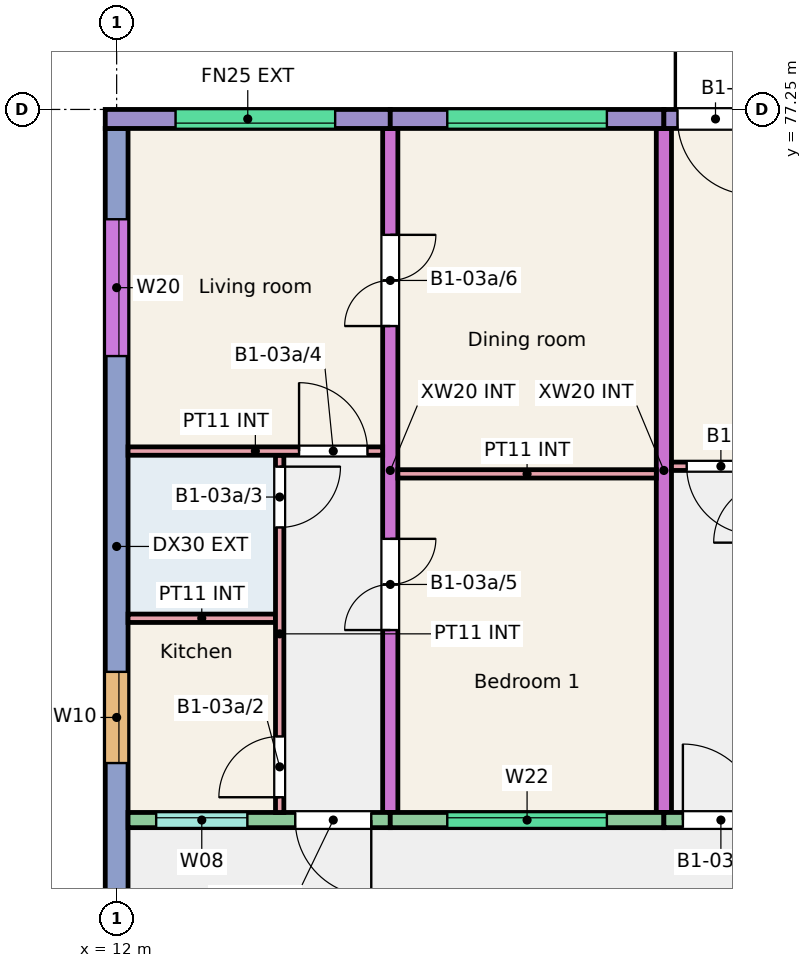
"""IFC4 building model, lengths in metres.
Left out: names, types, materials, properties, quantities, classifications, styles, units other than length and angle.
Written with IfcOpenShell. Run it as: python <this file> out.ifc"""

import sys

from ifc_helpers import new_model, si_unit, direction, frame, frame_2d, origin, place, context, subcontext, project, spatial, rectangle, extrude, element, fill, save


model = new_model("IFC4")
c1 = context("Model", 3, precision=1e-05, world=origin(), true_north=direction((0.0, 1.0)))
c2 = subcontext(c1, "Body", "Model", "MODEL_VIEW")
j1 = project(units=[si_unit("LENGTHUNIT", "METRE"), si_unit("PLANEANGLEUNIT", "RADIAN")], contexts=[c1])
p1 = place(None, origin())
s1 = spatial("IfcSite", under=j1, at=p1, CompositionType="ELEMENT")
p2 = place(p1, origin())
s2 = spatial("IfcBuilding", under=s1, at=p2, CompositionType="ELEMENT")
p3 = place(p2, frame((0.0, 0.0, 9.0)))
s3 = spatial("IfcBuildingStorey", under=s2, at=p3, CompositionType="ELEMENT", Elevation=9.0)
p4 = place(p3, frame((12.0, 66.0, 0.0), z_axis=(0.0, 0.0, 1.0), x_axis=(0.0, 1.0, 0.0)))
e1 = element("IfcWall", 1, at=p4, inside=s3, PredefinedType="SHEAR", context=c2, shape_type="SweptSolid", body=[
    extrude(rectangle(XDim=11.0, YDim=0.3, at=frame_2d((5.5, 0.0))), origin(), (0.0, 0.0, 1.0), 3.0),
])
p5 = place(p4, frame((2.65, 0.0, 0.9)))
e2 = element("IfcOpeningElement", 2, at=p5, cuts=e1, PredefinedType="OPENING", context=c2, shape_type="SweptSolid", body=[
    extrude(rectangle(XDim=1.2, YDim=1.5, at=frame_2d((0.6, 0.75))), frame((0.0, 0.16, 0.0), z_axis=(0.0, -1.0, 0.0), x_axis=(1.0, 0.0, 0.0)), (0.0, 0.0, 1.0), 0.32),
])
p6 = place(p4, frame((8.005, 0.0, 0.9)))
e3 = element("IfcOpeningElement", 3, at=p6, cuts=e1, PredefinedType="OPENING", context=c2, shape_type="SweptSolid", body=[
    extrude(rectangle(XDim=1.8, YDim=1.5, at=frame_2d((0.9, 0.75))), frame((0.0, 0.16, 0.0), z_axis=(0.0, -1.0, 0.0), x_axis=(1.0, 0.0, 0.0)), (0.0, 0.0, 1.0), 0.32),
])
p7 = place(p3, frame((15.6, 68.0, 0.0), z_axis=(0.0, 0.0, 1.0), x_axis=(0.0, 1.0, 0.0)))
e4 = element("IfcWall", 4, at=p7, inside=s3, PredefinedType="SHEAR", context=c2, shape_type="SweptSolid", body=[
    extrude(rectangle(XDim=9.0, YDim=0.2, at=frame_2d((4.5, 0.0))), origin(), (0.0, 0.0, 1.0), 3.0),
])
p8 = place(p7, frame((2.4, 0.0, 0.0)))
e5 = element("IfcOpeningElement", 5, at=p8, cuts=e4, PredefinedType="OPENING", context=c2, shape_type="SweptSolid", body=[
    extrude(rectangle(XDim=1.2, YDim=2.1, at=frame_2d((0.6, 1.05))), frame((0.0, 0.11, 0.0), z_axis=(0.0, -1.0, 0.0), x_axis=(1.0, 0.0, 0.0)), (0.0, 0.0, 1.0), 0.22),
])
p9 = place(p7, frame((6.4, 0.0, 0.0)))
e6 = element("IfcOpeningElement", 6, at=p9, cuts=e4, PredefinedType="OPENING", context=c2, shape_type="SweptSolid", body=[
    extrude(rectangle(XDim=1.2, YDim=2.1, at=frame_2d((0.6, 1.05))), frame((0.0, 0.11, 0.0), z_axis=(0.0, -1.0, 0.0), x_axis=(1.0, 0.0, 0.0)), (0.0, 0.0, 1.0), 0.22),
])
p10 = place(p3, frame((19.2, 68.0, 0.0), z_axis=(0.0, 0.0, 1.0), x_axis=(0.0, 1.0, 0.0)))
e7 = element("IfcWall", 7, at=p10, inside=s3, PredefinedType="SHEAR", context=c2, shape_type="SweptSolid", body=[
    extrude(rectangle(XDim=9.0, YDim=0.2, at=frame_2d((4.5, 0.0))), origin(), (0.0, 0.0, 1.0), 3.0),
])
p11 = place(p3, frame((11.85, 77.125, 0.0), z_axis=(0.0, 0.0, 1.0), x_axis=(1.0, 0.0, 0.0)))
e8 = element("IfcWall", 8, at=p11, inside=s3, PredefinedType="SOLIDWALL", context=c2, shape_type="SweptSolid", body=[
    extrude(rectangle(XDim=3.75, YDim=0.25, at=frame_2d((1.875, 0.0))), origin(), (0.0, 0.0, 1.0), 3.0),
])
p12 = place(p11, frame((0.925, 0.0, 1.2)))
e9 = element("IfcOpeningElement", 9, at=p12, cuts=e8, PredefinedType="OPENING", context=c2, shape_type="SweptSolid", body=[
    extrude(rectangle(XDim=2.1, YDim=1.2, at=frame_2d((1.05, 0.6))), frame((0.0, 0.135, 0.0), z_axis=(0.0, -1.0, 0.0), x_axis=(1.0, 0.0, 0.0)), (0.0, 0.0, 1.0), 0.27),
])
p13 = place(p3, frame((12.15, 67.9, 0.0), z_axis=(0.0, 0.0, 1.0), x_axis=(1.0, 0.0, 0.0)))
e10 = element("IfcWall", 10, at=p13, inside=s3, PredefinedType="SOLIDWALL", context=c2, shape_type="SweptSolid", body=[
    extrude(rectangle(XDim=3.45, YDim=0.2, at=frame_2d((1.725, 0.0))), origin(), (0.0, 0.0, 1.0), 3.0),
])
p14 = place(p13, frame((0.37, 0.0, 1.1)))
e11 = element("IfcOpeningElement", 11, at=p14, cuts=e10, PredefinedType="OPENING", context=c2, shape_type="SweptSolid", body=[
    extrude(rectangle(XDim=1.2, YDim=1.3, at=frame_2d((0.6, 0.65))), frame((0.0, 0.11, 0.0), z_axis=(0.0, -1.0, 0.0), x_axis=(1.0, 0.0, 0.0)), (0.0, 0.0, 1.0), 0.22),
])
p15 = place(p13, frame((2.2, 0.0, 0.0)))
e12 = element("IfcOpeningElement", 12, at=p15, cuts=e10, PredefinedType="OPENING", context=c2, shape_type="SweptSolid", body=[
    extrude(rectangle(XDim=1.0, YDim=2.1, at=frame_2d((0.5, 1.05))), frame((0.0, 0.11, 0.0), z_axis=(0.0, -1.0, 0.0), x_axis=(1.0, 0.0, 0.0)), (0.0, 0.0, 1.0), 0.22),
])
p16 = place(p3, frame((15.6, 77.125, 0.0), z_axis=(0.0, 0.0, 1.0), x_axis=(1.0, 0.0, 0.0)))
e13 = element("IfcWall", 13, at=p16, inside=s3, PredefinedType="SOLIDWALL", context=c2, shape_type="SweptSolid", body=[
    extrude(rectangle(XDim=3.6, YDim=0.25, at=frame_2d((1.8, 0.0))), origin(), (0.0, 0.0, 1.0), 3.0),
])
p17 = place(p16, frame((0.75, 0.0, 1.2)))
e14 = element("IfcOpeningElement", 14, at=p17, cuts=e13, PredefinedType="OPENING", context=c2, shape_type="SweptSolid", body=[
    extrude(rectangle(XDim=2.1, YDim=1.2, at=frame_2d((1.05, 0.6))), frame((0.0, 0.135, 0.0), z_axis=(0.0, -1.0, 0.0), x_axis=(1.0, 0.0, 0.0)), (0.0, 0.0, 1.0), 0.27),
])
p18 = place(p3, frame((15.6, 67.9, 0.0), z_axis=(0.0, 0.0, 1.0), x_axis=(1.0, 0.0, 0.0)))
e15 = element("IfcWall", 15, at=p18, inside=s3, PredefinedType="SOLIDWALL", context=c2, shape_type="SweptSolid", body=[
    extrude(rectangle(XDim=3.6, YDim=0.2, at=frame_2d((1.8, 0.0))), origin(), (0.0, 0.0, 1.0), 3.0),
])
p19 = place(p18, frame((0.75, 0.0, 1.2)))
e16 = element("IfcOpeningElement", 16, at=p19, cuts=e15, PredefinedType="OPENING", context=c2, shape_type="SweptSolid", body=[
    extrude(rectangle(XDim=2.1, YDim=1.2, at=frame_2d((1.05, 0.6))), frame((0.0, 0.11, 0.0), z_axis=(0.0, -1.0, 0.0), x_axis=(1.0, 0.0, 0.0)), (0.0, 0.0, 1.0), 0.22),
])
p20 = place(p3, frame((19.2, 77.125, 0.0), z_axis=(0.0, 0.0, 1.0), x_axis=(1.0, 0.0, 0.0)))
e17 = element("IfcWall", 17, at=p20, inside=s3, PredefinedType="SOLIDWALL", context=c2, shape_type="SweptSolid", body=[
    extrude(rectangle(XDim=3.6, YDim=0.25, at=frame_2d((1.8, 0.0))), origin(), (0.0, 0.0, 1.0), 3.0),
])
p21 = place(p20, frame((1.627, 0.0, 1.2)))
e18 = element("IfcOpeningElement", 18, at=p21, cuts=e17, PredefinedType="OPENING", context=c2, shape_type="SweptSolid", body=[
    extrude(rectangle(XDim=1.5, YDim=1.2, at=frame_2d((0.75, 0.6))), frame((0.0, 0.135, 0.0), z_axis=(0.0, -1.0, 0.0), x_axis=(1.0, 0.0, 0.0)), (0.0, 0.0, 1.0), 0.27),
])
p22 = place(p20, frame((0.179, 0.0, 0.0)))
e19 = element("IfcOpeningElement", 19, at=p22, cuts=e17, PredefinedType="OPENING", context=c2, shape_type="SweptSolid", body=[
    extrude(rectangle(XDim=1.0, YDim=2.1, at=frame_2d((0.5, 1.05))), frame((0.0, 0.135, 0.0), z_axis=(0.0, -1.0, 0.0), x_axis=(1.0, 0.0, 0.0)), (0.0, 0.0, 1.0), 0.27),
])
p23 = place(p3, frame((19.2, 67.9, 0.0), z_axis=(0.0, 0.0, 1.0), x_axis=(1.0, 0.0, 0.0)))
e20 = element("IfcWall", 20, at=p23, inside=s3, PredefinedType="SOLIDWALL", context=c2, shape_type="SweptSolid", body=[
    extrude(rectangle(XDim=3.6, YDim=0.2, at=frame_2d((1.8, 0.0))), origin(), (0.0, 0.0, 1.0), 3.0),
])
p24 = place(p23, frame((1.893, 0.0, 1.1)))
e21 = element("IfcOpeningElement", 21, at=p24, cuts=e20, PredefinedType="OPENING", context=c2, shape_type="SweptSolid", body=[
    extrude(rectangle(XDim=1.2, YDim=1.3, at=frame_2d((0.6, 0.65))), frame((0.0, 0.11, 0.0), z_axis=(0.0, -1.0, 0.0), x_axis=(1.0, 0.0, 0.0)), (0.0, 0.0, 1.0), 0.22),
])
p25 = place(p23, frame((0.25, 0.0, 0.0)))
e22 = element("IfcOpeningElement", 22, at=p25, cuts=e20, PredefinedType="OPENING", context=c2, shape_type="SweptSolid", body=[
    extrude(rectangle(XDim=1.0, YDim=2.1, at=frame_2d((0.5, 1.05))), frame((0.0, 0.11, 0.0), z_axis=(0.0, -1.0, 0.0), x_axis=(1.0, 0.0, 0.0)), (0.0, 0.0, 1.0), 0.22),
])
p26 = place(p3, frame((12.15, 70.555, 0.0), z_axis=(0.0, 0.0, 1.0), x_axis=(1.0, 0.0, 0.0)))
e23 = element("IfcWall", 23, at=p26, inside=s3, PredefinedType="PARTITIONING", context=c2, shape_type="SweptSolid", body=[
    extrude(rectangle(XDim=1.94, YDim=0.11, at=frame_2d((0.97, 0.0))), origin(), (0.0, 0.0, 1.0), 2.8),
])
p27 = place(p3, frame((14.145, 68.0, 0.0), z_axis=(0.0, 0.0, 1.0), x_axis=(0.0, 1.0, 0.0)))
e24 = element("IfcWall", 24, at=p27, inside=s3, PredefinedType="PARTITIONING", context=c2, shape_type="SweptSolid", body=[
    extrude(rectangle(XDim=4.7, YDim=0.11, at=frame_2d((2.35, 0.0))), origin(), (0.0, 0.0, 1.0), 2.8),
])
p28 = place(p27, frame((0.2, 0.0, 0.0)))
e25 = element("IfcOpeningElement", 25, at=p28, cuts=e24, PredefinedType="OPENING", context=c2, shape_type="SweptSolid", body=[
    extrude(rectangle(XDim=0.8, YDim=2.1, at=frame_2d((0.4, 1.05))), frame((0.0, 0.065, 0.0), z_axis=(0.0, -1.0, 0.0), x_axis=(1.0, 0.0, 0.0)), (0.0, 0.0, 1.0), 0.13),
])
p29 = place(p27, frame((3.75, 0.0, 0.0)))
e26 = element("IfcOpeningElement", 26, at=p29, cuts=e24, PredefinedType="OPENING", context=c2, shape_type="SweptSolid", body=[
    extrude(rectangle(XDim=0.8, YDim=2.1, at=frame_2d((0.4, 1.05))), frame((0.0, 0.065, 0.0), z_axis=(0.0, -1.0, 0.0), x_axis=(1.0, 0.0, 0.0)), (0.0, 0.0, 1.0), 0.13),
])
p30 = place(p3, frame((12.15, 72.755, 0.0), z_axis=(0.0, 0.0, 1.0), x_axis=(1.0, 0.0, 0.0)))
e27 = element("IfcWall", 27, at=p30, inside=s3, PredefinedType="PARTITIONING", context=c2, shape_type="SweptSolid", body=[
    extrude(rectangle(XDim=3.35, YDim=0.11, at=frame_2d((1.675, 0.0))), origin(), (0.0, 0.0, 1.0), 2.8),
])
p31 = place(p30, frame((2.25, 0.0, 0.0)))
e28 = element("IfcOpeningElement", 28, at=p31, cuts=e27, PredefinedType="OPENING", context=c2, shape_type="SweptSolid", body=[
    extrude(rectangle(XDim=0.9, YDim=2.1, at=frame_2d((0.45, 1.05))), frame((0.0, 0.065, 0.0), z_axis=(0.0, -1.0, 0.0), x_axis=(1.0, 0.0, 0.0)), (0.0, 0.0, 1.0), 0.13),
])
p32 = place(p3, frame((15.7, 72.455, 0.0), z_axis=(0.0, 0.0, 1.0), x_axis=(1.0, 0.0, 0.0)))
e29 = element("IfcWall", 29, at=p32, inside=s3, PredefinedType="PARTITIONING", context=c2, shape_type="SweptSolid", body=[
    extrude(rectangle(XDim=3.4, YDim=0.11, at=frame_2d((1.7, 0.0))), origin(), (0.0, 0.0, 1.0), 2.8),
])
p33 = place(p3, frame((19.3, 72.555, 0.0), z_axis=(0.0, 0.0, 1.0), x_axis=(1.0, 0.0, 0.0)))
e30 = element("IfcWall", 30, at=p33, inside=s3, PredefinedType="PARTITIONING", context=c2, shape_type="SweptSolid", body=[
    extrude(rectangle(XDim=3.375, YDim=0.11, at=frame_2d((1.688, 0.0))), origin(), (0.0, 0.0, 1.0), 2.8),
])
p34 = place(p33, frame((0.2, 0.0, 0.0)))
e31 = element("IfcOpeningElement", 31, at=p34, cuts=e30, PredefinedType="OPENING", context=c2, shape_type="SweptSolid", body=[
    extrude(rectangle(XDim=0.9, YDim=2.1, at=frame_2d((0.45, 1.05))), frame((0.0, 0.065, 0.0), z_axis=(0.0, -1.0, 0.0), x_axis=(1.0, 0.0, 0.0)), (0.0, 0.0, 1.0), 0.13),
])
p35 = place(p19, origin())
e32 = element("IfcWindow", 32, at=p35, inside=s3, PartitioningType="SINGLE_PANEL", PredefinedType="WINDOW", context=c2, shape_type="SweptSolid", body=[
    extrude(rectangle(XDim=2.1, YDim=1.2, at=frame_2d((1.05, 0.6))), frame((0.0, 0.06, 0.0), z_axis=(0.0, -1.0, 0.0), x_axis=(1.0, 0.0, 0.0)), (0.0, 0.0, 1.0), 0.06),
])
fill(e16, e32)
p36 = place(p17, origin())
e33 = element("IfcWindow", 33, at=p36, inside=s3, PartitioningType="SINGLE_PANEL", PredefinedType="WINDOW", context=c2, shape_type="SweptSolid", body=[
    extrude(rectangle(XDim=2.1, YDim=1.2, at=frame_2d((1.05, 0.6))), frame((0.0, -0.025, 0.0), z_axis=(0.0, -1.0, 0.0), x_axis=(1.0, 0.0, 0.0)), (0.0, 0.0, 1.0), 0.06),
])
fill(e14, e33)
p37 = place(p14, origin())
e34 = element("IfcWindow", 34, at=p37, inside=s3, PartitioningType="SINGLE_PANEL", PredefinedType="WINDOW", context=c2, shape_type="SweptSolid", body=[
    extrude(rectangle(XDim=1.2, YDim=1.3, at=frame_2d((0.6, 0.65))), frame((0.0, 0.06, 0.0), z_axis=(0.0, -1.0, 0.0), x_axis=(1.0, 0.0, 0.0)), (0.0, 0.0, 1.0), 0.06),
])
fill(e11, e34)
p38 = place(p12, origin())
e35 = element("IfcWindow", 35, at=p38, inside=s3, PartitioningType="SINGLE_PANEL", PredefinedType="WINDOW", context=c2, shape_type="SweptSolid", body=[
    extrude(rectangle(XDim=2.1, YDim=1.2, at=frame_2d((1.05, 0.6))), frame((0.0, -0.025, 0.0), z_axis=(0.0, -1.0, 0.0), x_axis=(1.0, 0.0, 0.0)), (0.0, 0.0, 1.0), 0.06),
])
fill(e9, e35)
p39 = place(p5, origin())
e36 = element("IfcWindow", 36, at=p39, inside=s3, PartitioningType="SINGLE_PANEL", PredefinedType="WINDOW", context=c2, shape_type="SweptSolid", body=[
    extrude(rectangle(XDim=1.2, YDim=1.5, at=frame_2d((0.6, 0.75))), frame((0.0, 0.0, 0.0), z_axis=(0.0, -1.0, 0.0), x_axis=(1.0, 0.0, 0.0)), (0.0, 0.0, 1.0), 0.06),
])
fill(e2, e36)
p40 = place(p6, origin())
e37 = element("IfcWindow", 37, at=p40, inside=s3, PartitioningType="SINGLE_PANEL", PredefinedType="WINDOW", context=c2, shape_type="SweptSolid", body=[
    extrude(rectangle(XDim=1.8, YDim=1.5, at=frame_2d((0.9, 0.75))), frame((0.0, 0.0, 0.0), z_axis=(0.0, -1.0, 0.0), x_axis=(1.0, 0.0, 0.0)), (0.0, 0.0, 1.0), 0.06),
])
fill(e3, e37)
p41 = place(p15, origin())
e38 = element("IfcDoor", 38, at=p41, inside=s3, OperationType="SINGLE_SWING_RIGHT", PredefinedType="DOOR", context=c2, shape_type="SweptSolid", body=[
    extrude(rectangle(XDim=1.0, YDim=2.1, at=frame_2d((0.5, 1.05))), frame((0.0, 0.025, 0.0), z_axis=(0.0, -1.0, 0.0), x_axis=(1.0, 0.0, 0.0)), (0.0, 0.0, 1.0), 0.05),
])
fill(e12, e38)
p42 = place(p28, origin())
e39 = element("IfcDoor", 39, at=p42, inside=s3, OperationType="SINGLE_SWING_LEFT", PredefinedType="DOOR", context=c2, shape_type="SweptSolid", body=[
    extrude(rectangle(XDim=0.8, YDim=2.1, at=frame_2d((0.4, 1.05))), frame((0.0, 0.025, 0.0), z_axis=(0.0, -1.0, 0.0), x_axis=(1.0, 0.0, 0.0)), (0.0, 0.0, 1.0), 0.05),
])
fill(e25, e39)
p43 = place(p29, origin())
e40 = element("IfcDoor", 40, at=p43, inside=s3, OperationType="SINGLE_SWING_RIGHT", PredefinedType="DOOR", context=c2, shape_type="SweptSolid", body=[
    extrude(rectangle(XDim=0.8, YDim=2.1, at=frame_2d((0.4, 1.05))), frame((0.0, 0.025, 0.0), z_axis=(0.0, -1.0, 0.0), x_axis=(1.0, 0.0, 0.0)), (0.0, 0.0, 1.0), 0.05),
])
fill(e26, e40)
p44 = place(p31, origin())
e41 = element("IfcDoor", 41, at=p44, inside=s3, OperationType="SINGLE_SWING_LEFT", PredefinedType="DOOR", context=c2, shape_type="SweptSolid", body=[
    extrude(rectangle(XDim=0.9, YDim=2.1, at=frame_2d((0.45, 1.05))), frame((0.0, 0.025, 0.0), z_axis=(0.0, -1.0, 0.0), x_axis=(1.0, 0.0, 0.0)), (0.0, 0.0, 1.0), 0.05),
])
fill(e28, e41)
p45 = place(p8, origin())
e42 = element("IfcDoor", 42, at=p45, inside=s3, OperationType="DOUBLE_DOOR_SINGLE_SWING", PredefinedType="DOOR", context=c2, shape_type="SweptSolid", body=[
    extrude(rectangle(XDim=1.2, YDim=2.1, at=frame_2d((0.6, 1.05))), frame((0.0, 0.025, 0.0), z_axis=(0.0, -1.0, 0.0), x_axis=(1.0, 0.0, 0.0)), (0.0, 0.0, 1.0), 0.05),
])
fill(e5, e42)
p46 = place(p9, origin())
e43 = element("IfcDoor", 43, at=p46, inside=s3, OperationType="DOUBLE_DOOR_SINGLE_SWING", PredefinedType="DOOR", context=c2, shape_type="SweptSolid", body=[
    extrude(rectangle(XDim=1.2, YDim=2.1, at=frame_2d((0.6, 1.05))), frame((0.0, 0.025, 0.0), z_axis=(0.0, -1.0, 0.0), x_axis=(1.0, 0.0, 0.0)), (0.0, 0.0, 1.0), 0.05),
])
fill(e6, e43)
p47 = place(p25, origin())
e44 = element("IfcDoor", 44, at=p47, inside=s3, OperationType="SINGLE_SWING_LEFT", PredefinedType="DOOR", context=c2, shape_type="SweptSolid", body=[
    extrude(rectangle(XDim=1.0, YDim=2.1, at=frame_2d((0.5, 1.05))), frame((0.0, 0.025, 0.0), z_axis=(0.0, -1.0, 0.0), x_axis=(1.0, 0.0, 0.0)), (0.0, 0.0, 1.0), 0.05),
])
fill(e22, e44)
p48 = place(p34, origin())
e45 = element("IfcDoor", 45, at=p48, inside=s3, OperationType="SINGLE_SWING_RIGHT", PredefinedType="DOOR", context=c2, shape_type="SweptSolid", body=[
    extrude(rectangle(XDim=0.9, YDim=2.1, at=frame_2d((0.45, 1.05))), frame((0.0, 0.025, 0.0), z_axis=(0.0, -1.0, 0.0), x_axis=(1.0, 0.0, 0.0)), (0.0, 0.0, 1.0), 0.05),
])
fill(e31, e45)
p49 = place(p22, origin())
e46 = element("IfcDoor", 46, at=p49, inside=s3, OperationType="SINGLE_SWING_RIGHT", PredefinedType="DOOR", context=c2, shape_type="SweptSolid", body=[
    extrude(rectangle(XDim=1.0, YDim=2.1, at=frame_2d((0.5, 1.05))), frame((0.0, 0.025, 0.0), z_axis=(0.0, -1.0, 0.0), x_axis=(1.0, 0.0, 0.0)), (0.0, 0.0, 1.0), 0.05),
])
fill(e19, e46)
save(model, sys.argv[1])
